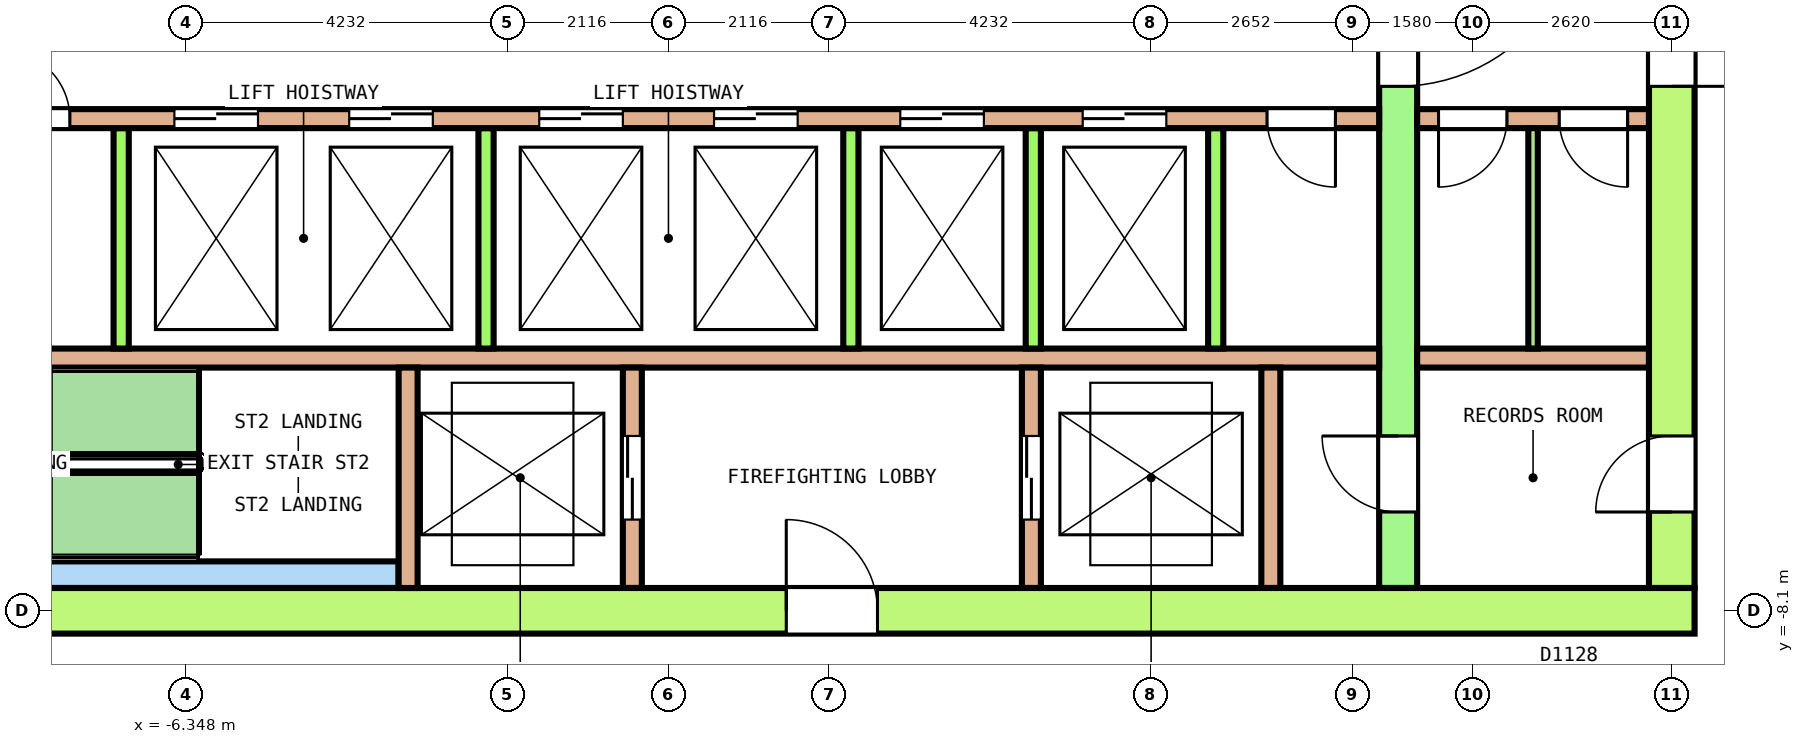
"""IFC4 building model, lengths in metres.
Left out: names, types, materials, properties, quantities, classifications, styles, units other than length and angle.
Written with IfcOpenShell. Run it as: python <this file> out.ifc"""

import sys

from ifc_helpers import new_model, si_unit, direction, frame, frame_2d, origin, place, context, subcontext, project, spatial, rectangle, extrude, element, fill, save


model = new_model("IFC4")
c1 = context("Model", 3, precision=1e-05, world=origin(), true_north=direction((0.0, 1.0)))
c2 = subcontext(c1, "Body", "Model", "MODEL_VIEW")
j1 = project(units=[si_unit("LENGTHUNIT", "METRE"), si_unit("PLANEANGLEUNIT", "RADIAN")], contexts=[c1])
p1 = place(None, origin())
s1 = spatial("IfcSite", under=j1, at=p1, CompositionType="ELEMENT")
p2 = place(p1, origin())
s2 = spatial("IfcBuilding", under=s1, at=p2, CompositionType="ELEMENT")
p3 = place(p2, frame((0.0, 0.0, 231.4)))
s3 = spatial("IfcBuildingStorey", under=s2, at=p3, CompositionType="ELEMENT", Elevation=231.4)
p4 = place(p3, frame((-13.5, -8.1, 0.0), z_axis=(0.0, 0.0, 1.0), x_axis=(1.0, 0.0, 0.0)))
e1 = element("IfcWall", 1, at=p4, inside=s3, PredefinedType="SHEAR", context=c2, shape_type="SweptSolid", body=[
    extrude(rectangle(XDim=27.0, YDim=0.6, at=frame_2d((13.5, 0.0))), origin(), (0.0, 0.0, 1.0), 5.7),
])
p5 = place(p4, frame((15.05, 0.0, 0.0)))
e2 = element("IfcOpeningElement", 2, at=p5, cuts=e1, PredefinedType="OPENING", context=c2, shape_type="SweptSolid", body=[
    extrude(rectangle(XDim=1.2, YDim=2.1, at=frame_2d((0.6, 1.05))), frame((0.0, 0.31, 0.0), z_axis=(0.0, -1.0, 0.0), x_axis=(1.0, 0.0, 0.0)), (0.0, 0.0, 1.0), 0.62),
])
p6 = place(p3, frame((13.2, -7.8, 0.0), z_axis=(0.0, 0.0, 1.0), x_axis=(0.0, 1.0, 0.0)))
e3 = element("IfcWall", 3, at=p6, inside=s3, PredefinedType="SHEAR", context=c2, shape_type="SweptSolid", body=[
    extrude(rectangle(XDim=15.6, YDim=0.6, at=frame_2d((7.8, 0.0))), origin(), (0.0, 0.0, 1.0), 5.7),
])
p7 = place(p6, frame((6.6, 0.0, 0.0)))
e4 = element("IfcOpeningElement", 4, at=p7, cuts=e3, PredefinedType="OPENING", context=c2, shape_type="SweptSolid", body=[
    extrude(rectangle(XDim=2.4, YDim=2.1, at=frame_2d((1.2, 1.05))), frame((0.0, 0.31, 0.0), z_axis=(0.0, -1.0, 0.0), x_axis=(1.0, 0.0, 0.0)), (0.0, 0.0, 1.0), 0.62),
])
p8 = place(p6, frame((13.5, 0.0, 0.0)))
e5 = element("IfcOpeningElement", 5, at=p8, cuts=e3, PredefinedType="OPENING", context=c2, shape_type="SweptSolid", body=[
    extrude(rectangle(XDim=1.2, YDim=2.1, at=frame_2d((0.6, 1.05))), frame((0.0, 0.31, 0.0), z_axis=(0.0, -1.0, 0.0), x_axis=(1.0, 0.0, 0.0)), (0.0, 0.0, 1.0), 0.62),
])
p9 = place(p6, frame((1.0, 0.0, 0.0)))
e6 = element("IfcOpeningElement", 6, at=p9, cuts=e3, PredefinedType="OPENING", context=c2, shape_type="SweptSolid", body=[
    extrude(rectangle(XDim=1.0, YDim=2.1, at=frame_2d((0.5, 1.05))), frame((0.0, 0.31, 0.0), z_axis=(0.0, -1.0, 0.0), x_axis=(1.0, 0.0, 0.0)), (0.0, 0.0, 1.0), 0.62),
])
p10 = place(p3, frame((9.6, -7.8, 0.0), z_axis=(0.0, 0.0, 1.0), x_axis=(0.0, 1.0, 0.0)))
e7 = element("IfcWall", 7, at=p10, inside=s3, PredefinedType="SHEAR", context=c2, shape_type="SweptSolid", body=[
    extrude(rectangle(XDim=15.6, YDim=0.5, at=frame_2d((7.8, 0.0))), origin(), (0.0, 0.0, 1.0), 5.7),
])
p11 = place(p10, frame((6.6, 0.0, 0.0)))
e8 = element("IfcOpeningElement", 8, at=p11, cuts=e7, PredefinedType="OPENING", context=c2, shape_type="SweptSolid", body=[
    extrude(rectangle(XDim=2.4, YDim=2.1, at=frame_2d((1.2, 1.05))), frame((0.0, 0.26, 0.0), z_axis=(0.0, -1.0, 0.0), x_axis=(1.0, 0.0, 0.0)), (0.0, 0.0, 1.0), 0.52),
])
p12 = place(p10, frame((13.5, 0.0, 0.0)))
e9 = element("IfcOpeningElement", 9, at=p12, cuts=e7, PredefinedType="OPENING", context=c2, shape_type="SweptSolid", body=[
    extrude(rectangle(XDim=1.2, YDim=2.1, at=frame_2d((0.6, 1.05))), frame((0.0, 0.26, 0.0), z_axis=(0.0, -1.0, 0.0), x_axis=(1.0, 0.0, 0.0)), (0.0, 0.0, 1.0), 0.52),
])
p13 = place(p10, frame((1.0, 0.0, 0.0)))
e10 = element("IfcOpeningElement", 10, at=p13, cuts=e7, PredefinedType="OPENING", context=c2, shape_type="SweptSolid", body=[
    extrude(rectangle(XDim=1.0, YDim=2.1, at=frame_2d((0.5, 1.05))), frame((0.0, 0.26, 0.0), z_axis=(0.0, -1.0, 0.0), x_axis=(1.0, 0.0, 0.0)), (0.0, 0.0, 1.0), 0.52),
])
p14 = place(p3, frame((-9.35, -1.625, 0.0), z_axis=(0.0, 0.0, 1.0), x_axis=(1.0, 0.0, 0.0)))
e11 = element("IfcWall", 11, at=p14, inside=s3, PredefinedType="SOLIDWALL", context=c2, shape_type="SweptSolid", body=[
    extrude(rectangle(XDim=18.7, YDim=0.25, at=frame_2d((9.35, 0.0))), origin(), (0.0, 0.0, 1.0), 5.7),
])
p15 = place(p14, frame((2.85, 0.0, 0.0)))
e12 = element("IfcOpeningElement", 12, at=p15, cuts=e11, PredefinedType="OPENING", context=c2, shape_type="SweptSolid", body=[
    extrude(rectangle(XDim=1.1, YDim=2.1, at=frame_2d((0.55, 1.05))), frame((0.0, 0.135, 0.0), z_axis=(0.0, -1.0, 0.0), x_axis=(1.0, 0.0, 0.0)), (0.0, 0.0, 1.0), 0.27),
])
p16 = place(p14, frame((5.15, 0.0, 0.0)))
e13 = element("IfcOpeningElement", 13, at=p16, cuts=e11, PredefinedType="OPENING", context=c2, shape_type="SweptSolid", body=[
    extrude(rectangle(XDim=1.1, YDim=2.1, at=frame_2d((0.55, 1.05))), frame((0.0, 0.135, 0.0), z_axis=(0.0, -1.0, 0.0), x_axis=(1.0, 0.0, 0.0)), (0.0, 0.0, 1.0), 0.27),
])
p17 = place(p14, frame((7.65, 0.0, 0.0)))
e14 = element("IfcOpeningElement", 14, at=p17, cuts=e11, PredefinedType="OPENING", context=c2, shape_type="SweptSolid", body=[
    extrude(rectangle(XDim=1.1, YDim=2.1, at=frame_2d((0.55, 1.05))), frame((0.0, 0.135, 0.0), z_axis=(0.0, -1.0, 0.0), x_axis=(1.0, 0.0, 0.0)), (0.0, 0.0, 1.0), 0.27),
])
p18 = place(p14, frame((9.95, 0.0, 0.0)))
e15 = element("IfcOpeningElement", 15, at=p18, cuts=e11, PredefinedType="OPENING", context=c2, shape_type="SweptSolid", body=[
    extrude(rectangle(XDim=1.1, YDim=2.1, at=frame_2d((0.55, 1.05))), frame((0.0, 0.135, 0.0), z_axis=(0.0, -1.0, 0.0), x_axis=(1.0, 0.0, 0.0)), (0.0, 0.0, 1.0), 0.27),
])
p19 = place(p14, frame((12.4, 0.0, 0.0)))
e16 = element("IfcOpeningElement", 16, at=p19, cuts=e11, PredefinedType="OPENING", context=c2, shape_type="SweptSolid", body=[
    extrude(rectangle(XDim=1.1, YDim=2.1, at=frame_2d((0.55, 1.05))), frame((0.0, 0.135, 0.0), z_axis=(0.0, -1.0, 0.0), x_axis=(1.0, 0.0, 0.0)), (0.0, 0.0, 1.0), 0.27),
])
p20 = place(p14, frame((14.8, 0.0, 0.0)))
e17 = element("IfcOpeningElement", 17, at=p20, cuts=e11, PredefinedType="OPENING", context=c2, shape_type="SweptSolid", body=[
    extrude(rectangle(XDim=1.1, YDim=2.1, at=frame_2d((0.55, 1.05))), frame((0.0, 0.135, 0.0), z_axis=(0.0, -1.0, 0.0), x_axis=(1.0, 0.0, 0.0)), (0.0, 0.0, 1.0), 0.27),
])
p21 = place(p14, frame((0.575, 0.0, 0.0)))
e18 = element("IfcOpeningElement", 18, at=p21, cuts=e11, PredefinedType="OPENING", context=c2, shape_type="SweptSolid", body=[
    extrude(rectangle(XDim=0.9, YDim=2.1, at=frame_2d((0.45, 1.05))), frame((0.0, 0.135, 0.0), z_axis=(0.0, -1.0, 0.0), x_axis=(1.0, 0.0, 0.0)), (0.0, 0.0, 1.0), 0.27),
])
p22 = place(p14, frame((17.225, 0.0, 0.0)))
e19 = element("IfcOpeningElement", 19, at=p22, cuts=e11, PredefinedType="OPENING", context=c2, shape_type="SweptSolid", body=[
    extrude(rectangle(XDim=0.9, YDim=2.1, at=frame_2d((0.45, 1.05))), frame((0.0, 0.135, 0.0), z_axis=(0.0, -1.0, 0.0), x_axis=(1.0, 0.0, 0.0)), (0.0, 0.0, 1.0), 0.27),
])
p23 = place(p3, frame((9.85, -1.625, 0.0), z_axis=(0.0, 0.0, 1.0), x_axis=(1.0, 0.0, 0.0)))
e20 = element("IfcWall", 20, at=p23, inside=s3, PredefinedType="SOLIDWALL", context=c2, shape_type="SweptSolid", body=[
    extrude(rectangle(XDim=3.05, YDim=0.25, at=frame_2d((1.525, 0.0))), origin(), (0.0, 0.0, 1.0), 5.7),
])
p24 = place(p23, frame((0.281, 0.0, 0.0)))
e21 = element("IfcOpeningElement", 21, at=p24, cuts=e20, PredefinedType="OPENING", context=c2, shape_type="SweptSolid", body=[
    extrude(rectangle(XDim=0.9, YDim=2.1, at=frame_2d((0.45, 1.05))), frame((0.0, 0.135, 0.0), z_axis=(0.0, -1.0, 0.0), x_axis=(1.0, 0.0, 0.0)), (0.0, 0.0, 1.0), 0.27),
])
p25 = place(p23, frame((1.869, 0.0, 0.0)))
e22 = element("IfcOpeningElement", 22, at=p25, cuts=e20, PredefinedType="OPENING", context=c2, shape_type="SweptSolid", body=[
    extrude(rectangle(XDim=0.9, YDim=2.1, at=frame_2d((0.45, 1.05))), frame((0.0, 0.135, 0.0), z_axis=(0.0, -1.0, 0.0), x_axis=(1.0, 0.0, 0.0)), (0.0, 0.0, 1.0), 0.27),
])
p26 = place(p3, frame((-9.35, -4.775, 0.0), z_axis=(0.0, 0.0, 1.0), x_axis=(1.0, 0.0, 0.0)))
e23 = element("IfcWall", 23, at=p26, inside=s3, PredefinedType="SOLIDWALL", context=c2, shape_type="SweptSolid", body=[
    extrude(rectangle(XDim=18.7, YDim=0.25, at=frame_2d((9.35, 0.0))), origin(), (0.0, 0.0, 1.0), 5.7),
])
p27 = place(p3, frame((9.85, -4.775, 0.0), z_axis=(0.0, 0.0, 1.0), x_axis=(1.0, 0.0, 0.0)))
e24 = element("IfcWall", 24, at=p27, inside=s3, PredefinedType="SOLIDWALL", context=c2, shape_type="SweptSolid", body=[
    extrude(rectangle(XDim=3.05, YDim=0.25, at=frame_2d((1.525, 0.0))), origin(), (0.0, 0.0, 1.0), 5.7),
])
for number, where, z_axis, x_axis in (
    (25, (-7.2, -4.65, 0.0), (0.0, 0.0, 1.0), (0.0, 1.0, 0.0)),
    (26, (-2.4, -4.65, 0.0), (0.0, 0.0, 1.0), (0.0, 1.0, 0.0)),
    (27, (2.4, -4.65, 0.0), (0.0, 0.0, 1.0), (0.0, 1.0, 0.0)),
    (28, (4.8, -4.65, 0.0), (0.0, 0.0, 1.0), (0.0, 1.0, 0.0)),
    (29, (7.2, -4.65, 0.0), (0.0, 0.0, 1.0), (0.0, 1.0, 0.0)),
):
    element("IfcWall", number, at=place(p3, frame(where, z_axis=z_axis, x_axis=x_axis)), inside=s3, PredefinedType="SOLIDWALL", context=c2, shape_type="SweptSolid", body=[
        extrude(rectangle(XDim=2.9, YDim=0.2, at=frame_2d((1.45, 0.0))), origin(), (0.0, 0.0, 1.0), 5.7),
    ])
p28 = place(p3, frame((-9.35, -7.625, 0.0), z_axis=(0.0, 0.0, 1.0), x_axis=(1.0, 0.0, 0.0)))
e30 = element("IfcWall", 30, at=p28, inside=s3, PredefinedType="SOLIDWALL", context=c2, shape_type="SweptSolid", body=[
    extrude(rectangle(XDim=5.8, YDim=0.35, at=frame_2d((2.9, 0.0))), origin(), (0.0, 0.0, 1.0), 5.7),
])
p29 = place(p3, frame((-3.425, -7.8, 0.0), z_axis=(0.0, 0.0, 1.0), x_axis=(0.0, 1.0, 0.0)))
e31 = element("IfcWall", 31, at=p29, inside=s3, PredefinedType="SOLIDWALL", context=c2, shape_type="SweptSolid", body=[
    extrude(rectangle(XDim=2.9, YDim=0.25, at=frame_2d((1.45, 0.0))), origin(), (0.0, 0.0, 1.0), 5.7),
])
p30 = place(p3, frame((-0.475, -7.8, 0.0), z_axis=(0.0, 0.0, 1.0), x_axis=(0.0, 1.0, 0.0)))
e32 = element("IfcWall", 32, at=p30, inside=s3, PredefinedType="SOLIDWALL", context=c2, shape_type="SweptSolid", body=[
    extrude(rectangle(XDim=2.9, YDim=0.25, at=frame_2d((1.45, 0.0))), origin(), (0.0, 0.0, 1.0), 5.7),
])
p31 = place(p30, frame((0.9, 0.0, 0.0)))
e33 = element("IfcOpeningElement", 33, at=p31, cuts=e32, PredefinedType="OPENING", context=c2, shape_type="SweptSolid", body=[
    extrude(rectangle(XDim=1.1, YDim=2.1, at=frame_2d((0.55, 1.05))), frame((0.0, 0.135, 0.0), z_axis=(0.0, -1.0, 0.0), x_axis=(1.0, 0.0, 0.0)), (0.0, 0.0, 1.0), 0.27),
])
p32 = place(p3, frame((4.775, -7.8, 0.0), z_axis=(0.0, 0.0, 1.0), x_axis=(0.0, 1.0, 0.0)))
e34 = element("IfcWall", 34, at=p32, inside=s3, PredefinedType="SOLIDWALL", context=c2, shape_type="SweptSolid", body=[
    extrude(rectangle(XDim=2.9, YDim=0.25, at=frame_2d((1.45, 0.0))), origin(), (0.0, 0.0, 1.0), 5.7),
])
p33 = place(p32, frame((0.9, 0.0, 0.0)))
e35 = element("IfcOpeningElement", 35, at=p33, cuts=e34, PredefinedType="OPENING", context=c2, shape_type="SweptSolid", body=[
    extrude(rectangle(XDim=1.1, YDim=2.1, at=frame_2d((0.55, 1.05))), frame((0.0, 0.135, 0.0), z_axis=(0.0, -1.0, 0.0), x_axis=(1.0, 0.0, 0.0)), (0.0, 0.0, 1.0), 0.27),
])
p34 = place(p3, frame((7.925, -7.8, 0.0), z_axis=(0.0, 0.0, 1.0), x_axis=(0.0, 1.0, 0.0)))
e36 = element("IfcWall", 36, at=p34, inside=s3, PredefinedType="SOLIDWALL", context=c2, shape_type="SweptSolid", body=[
    extrude(rectangle(XDim=2.9, YDim=0.25, at=frame_2d((1.45, 0.0))), origin(), (0.0, 0.0, 1.0), 5.7),
])
p35 = place(p3, frame((11.375, -4.65, 0.0), z_axis=(0.0, 0.0, 1.0), x_axis=(0.0, 1.0, 0.0)))
e37 = element("IfcWall", 37, at=p35, inside=s3, PredefinedType="PARTITIONING", context=c2, shape_type="SweptSolid", body=[
    extrude(rectangle(XDim=2.9, YDim=0.125, at=frame_2d((1.45, 0.0))), origin(), (0.0, 0.0, 1.0), 5.7),
])
p36 = place(p15, origin())
e38 = element("IfcDoor", 38, at=p36, inside=s3, OperationType="DOUBLE_DOOR_SLIDING", PredefinedType="DOOR", context=c2, shape_type="SweptSolid", body=[
    extrude(rectangle(XDim=1.1, YDim=2.1, at=frame_2d((0.55, 1.05))), frame((0.0, 0.075, 0.0), z_axis=(0.0, -1.0, 0.0), x_axis=(1.0, 0.0, 0.0)), (0.0, 0.0, 1.0), 0.15),
])
fill(e12, e38)
p37 = place(p16, origin())
e39 = element("IfcDoor", 39, at=p37, inside=s3, OperationType="DOUBLE_DOOR_SLIDING", PredefinedType="DOOR", context=c2, shape_type="SweptSolid", body=[
    extrude(rectangle(XDim=1.1, YDim=2.1, at=frame_2d((0.55, 1.05))), frame((0.0, 0.075, 0.0), z_axis=(0.0, -1.0, 0.0), x_axis=(1.0, 0.0, 0.0)), (0.0, 0.0, 1.0), 0.15),
])
fill(e13, e39)
p38 = place(p17, origin())
e40 = element("IfcDoor", 40, at=p38, inside=s3, OperationType="DOUBLE_DOOR_SLIDING", PredefinedType="DOOR", context=c2, shape_type="SweptSolid", body=[
    extrude(rectangle(XDim=1.1, YDim=2.1, at=frame_2d((0.55, 1.05))), frame((0.0, 0.075, 0.0), z_axis=(0.0, -1.0, 0.0), x_axis=(1.0, 0.0, 0.0)), (0.0, 0.0, 1.0), 0.15),
])
fill(e14, e40)
p39 = place(p18, origin())
e41 = element("IfcDoor", 41, at=p39, inside=s3, OperationType="DOUBLE_DOOR_SLIDING", PredefinedType="DOOR", context=c2, shape_type="SweptSolid", body=[
    extrude(rectangle(XDim=1.1, YDim=2.1, at=frame_2d((0.55, 1.05))), frame((0.0, 0.075, 0.0), z_axis=(0.0, -1.0, 0.0), x_axis=(1.0, 0.0, 0.0)), (0.0, 0.0, 1.0), 0.15),
])
fill(e15, e41)
p40 = place(p19, origin())
e42 = element("IfcDoor", 42, at=p40, inside=s3, OperationType="DOUBLE_DOOR_SLIDING", PredefinedType="DOOR", context=c2, shape_type="SweptSolid", body=[
    extrude(rectangle(XDim=1.1, YDim=2.1, at=frame_2d((0.55, 1.05))), frame((0.0, 0.075, 0.0), z_axis=(0.0, -1.0, 0.0), x_axis=(1.0, 0.0, 0.0)), (0.0, 0.0, 1.0), 0.15),
])
fill(e16, e42)
p41 = place(p20, origin())
e43 = element("IfcDoor", 43, at=p41, inside=s3, OperationType="DOUBLE_DOOR_SLIDING", PredefinedType="DOOR", context=c2, shape_type="SweptSolid", body=[
    extrude(rectangle(XDim=1.1, YDim=2.1, at=frame_2d((0.55, 1.05))), frame((0.0, 0.075, 0.0), z_axis=(0.0, -1.0, 0.0), x_axis=(1.0, 0.0, 0.0)), (0.0, 0.0, 1.0), 0.15),
])
fill(e17, e43)
p42 = place(p31, origin())
e44 = element("IfcDoor", 44, at=p42, inside=s3, OperationType="DOUBLE_DOOR_SLIDING", PredefinedType="DOOR", context=c2, shape_type="SweptSolid", body=[
    extrude(rectangle(XDim=1.1, YDim=2.1, at=frame_2d((0.55, 1.05))), frame((0.0, 0.075, 0.0), z_axis=(0.0, -1.0, 0.0), x_axis=(1.0, 0.0, 0.0)), (0.0, 0.0, 1.0), 0.15),
])
fill(e33, e44)
p43 = place(p33, origin())
e45 = element("IfcDoor", 45, at=p43, inside=s3, OperationType="DOUBLE_DOOR_SLIDING", PredefinedType="DOOR", context=c2, shape_type="SweptSolid", body=[
    extrude(rectangle(XDim=1.1, YDim=2.1, at=frame_2d((0.55, 1.05))), frame((0.0, 0.075, 0.0), z_axis=(0.0, -1.0, 0.0), x_axis=(1.0, 0.0, 0.0)), (0.0, 0.0, 1.0), 0.15),
])
fill(e35, e45)
p44 = place(p11, origin())
e46 = element("IfcDoor", 46, at=p44, inside=s3, OperationType="DOUBLE_DOOR_SINGLE_SWING", PredefinedType="DOOR", context=c2, shape_type="SweptSolid", body=[
    extrude(rectangle(XDim=2.4, YDim=2.1, at=frame_2d((1.2, 1.05))), frame((0.0, 0.2, 0.0), z_axis=(0.0, -1.0, 0.0), x_axis=(1.0, 0.0, 0.0)), (0.0, 0.0, 1.0), 0.4),
])
fill(e8, e46)
p45 = place(p7, origin())
e47 = element("IfcDoor", 47, at=p45, inside=s3, OperationType="DOUBLE_DOOR_SINGLE_SWING", PredefinedType="DOOR", context=c2, shape_type="SweptSolid", body=[
    extrude(rectangle(XDim=2.4, YDim=2.1, at=frame_2d((1.2, 1.05))), frame((0.0, 0.25, 0.0), z_axis=(0.0, -1.0, 0.0), x_axis=(1.0, 0.0, 0.0)), (0.0, 0.0, 1.0), 0.5),
])
fill(e4, e47)
p46 = place(p5, origin())
e48 = element("IfcDoor", 48, at=p46, inside=s3, OperationType="SINGLE_SWING_RIGHT", PredefinedType="DOOR", context=c2, shape_type="SweptSolid", body=[
    extrude(rectangle(XDim=1.2, YDim=2.1, at=frame_2d((0.6, 1.05))), frame((0.0, 0.25, 0.0), z_axis=(0.0, -1.0, 0.0), x_axis=(1.0, 0.0, 0.0)), (0.0, 0.0, 1.0), 0.5),
])
fill(e2, e48)
p47 = place(p13, origin())
e49 = element("IfcDoor", 49, at=p47, inside=s3, OperationType="SINGLE_SWING_RIGHT", PredefinedType="DOOR", context=c2, shape_type="SweptSolid", body=[
    extrude(rectangle(XDim=1.0, YDim=2.1, at=frame_2d((0.5, 1.05))), frame((0.0, 0.2, 0.0), z_axis=(0.0, -1.0, 0.0), x_axis=(1.0, 0.0, 0.0)), (0.0, 0.0, 1.0), 0.4),
])
fill(e10, e49)
p48 = place(p9, origin())
e50 = element("IfcDoor", 50, at=p48, inside=s3, OperationType="SINGLE_SWING_LEFT", PredefinedType="DOOR", context=c2, shape_type="SweptSolid", body=[
    extrude(rectangle(XDim=1.0, YDim=2.1, at=frame_2d((0.5, 1.05))), frame((0.0, 0.25, 0.0), z_axis=(0.0, -1.0, 0.0), x_axis=(1.0, 0.0, 0.0)), (0.0, 0.0, 1.0), 0.5),
])
fill(e6, e50)
p49 = place(p21, origin())
e51 = element("IfcDoor", 51, at=p49, inside=s3, OperationType="SINGLE_SWING_RIGHT", PredefinedType="DOOR", context=c2, shape_type="SweptSolid", body=[
    extrude(rectangle(XDim=0.9, YDim=2.1, at=frame_2d((0.45, 1.05))), frame((0.0, 0.075, 0.0), z_axis=(0.0, -1.0, 0.0), x_axis=(1.0, 0.0, 0.0)), (0.0, 0.0, 1.0), 0.15),
])
fill(e18, e51)
p50 = place(p22, origin())
e52 = element("IfcDoor", 52, at=p50, inside=s3, OperationType="SINGLE_SWING_LEFT", PredefinedType="DOOR", context=c2, shape_type="SweptSolid", body=[
    extrude(rectangle(XDim=0.9, YDim=2.1, at=frame_2d((0.45, 1.05))), frame((0.0, 0.075, 0.0), z_axis=(0.0, -1.0, 0.0), x_axis=(1.0, 0.0, 0.0)), (0.0, 0.0, 1.0), 0.15),
])
fill(e19, e52)
p51 = place(p24, origin())
e53 = element("IfcDoor", 53, at=p51, inside=s3, OperationType="SINGLE_SWING_RIGHT", PredefinedType="DOOR", context=c2, shape_type="SweptSolid", body=[
    extrude(rectangle(XDim=0.9, YDim=2.1, at=frame_2d((0.45, 1.05))), frame((0.0, 0.075, 0.0), z_axis=(0.0, -1.0, 0.0), x_axis=(1.0, 0.0, 0.0)), (0.0, 0.0, 1.0), 0.15),
])
fill(e21, e53)
p52 = place(p25, origin())
e54 = element("IfcDoor", 54, at=p52, inside=s3, OperationType="SINGLE_SWING_LEFT", PredefinedType="DOOR", context=c2, shape_type="SweptSolid", body=[
    extrude(rectangle(XDim=0.9, YDim=2.1, at=frame_2d((0.45, 1.05))), frame((0.0, 0.075, 0.0), z_axis=(0.0, -1.0, 0.0), x_axis=(1.0, 0.0, 0.0)), (0.0, 0.0, 1.0), 0.15),
])
fill(e22, e54)
save(model, sys.argv[1])
